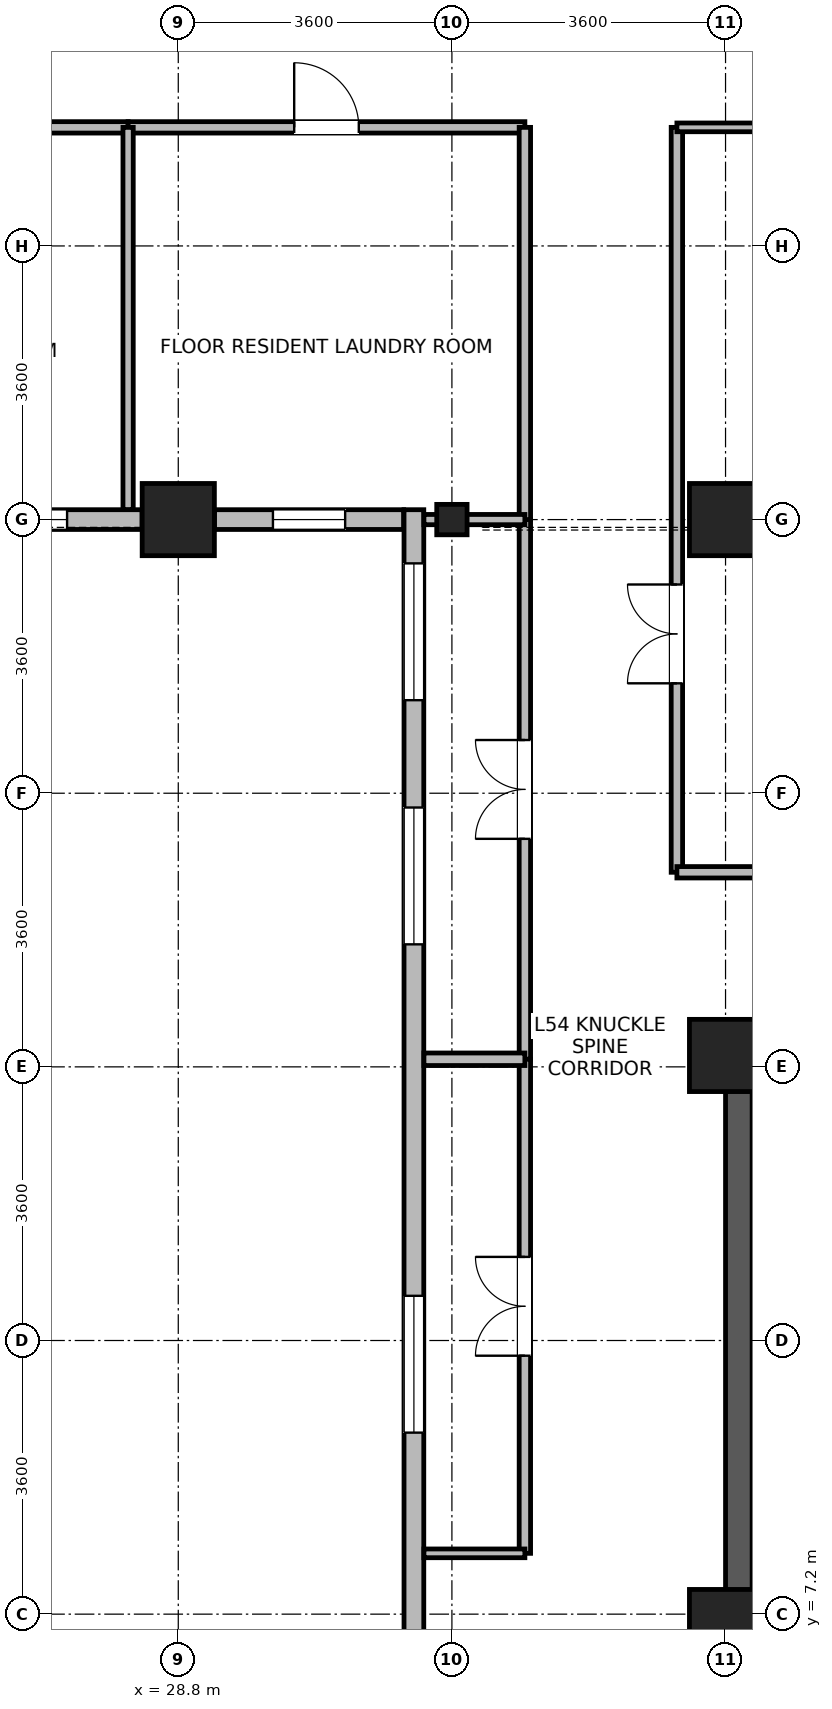
"""IFC4 building model, lengths in metres.
Left out: names, types, materials, properties, quantities, classifications, styles, units other than length and angle.
Written with IfcOpenShell. Run it as: python <this file> out.ifc"""

import sys

from ifc_helpers import new_model, si_unit, direction, frame, frame_2d, origin, origin_2d, place, context, subcontext, project, spatial, rectangle, i_section, extrude, source, transform, mapped, element, fill, save


model = new_model("IFC4")
c1 = context("Model", 3, precision=1e-05, world=origin(), true_north=direction((0.0, 1.0)))
c2 = subcontext(c1, "Body", "Model", "MODEL_VIEW")
j1 = project(units=[si_unit("LENGTHUNIT", "METRE"), si_unit("PLANEANGLEUNIT", "RADIAN")], contexts=[c1])
p1 = place(None, origin())
s1 = spatial("IfcSite", under=j1, at=p1, CompositionType="ELEMENT")
p2 = place(p1, origin())
s2 = spatial("IfcBuilding", under=s1, at=p2, CompositionType="ELEMENT")
p3 = place(p2, frame((0.0, 0.0, 212.9)))
s3 = spatial("IfcBuildingStorey", under=s2, at=p3, CompositionType="ELEMENT", Elevation=212.9)
p4 = place(p3, frame((36.175, 6.95, 0.0), z_axis=(0.0, 0.0, 1.0), x_axis=(0.0, 1.0, 0.0)))
e1 = element("IfcWall", 1, at=p4, inside=s3, PredefinedType="SHEAR", context=c2, shape_type="SweptSolid", body=[
    extrude(rectangle(XDim=7.7, YDim=0.35, at=frame_2d((3.85, 0.0))), origin(), (0.0, 0.0, 1.0), 3.47),
])
m1 = source(origin(), c2, "Body", "SweptSolid", [
    extrude(rectangle(XDim=0.95, YDim=0.95, at=origin_2d()), origin(), (0.0, 0.0, 1.0), 3.7),
])
for number, where, z_axis, x_axis in (
    (2, (28.8, 21.6, 0.0), (0.0, 0.0, 1.0), (1.0, 0.0, 0.0)),
    (3, (36.0, 21.6, 0.0), (0.0, 0.0, 1.0), (1.0, 0.0, 0.0)),
    (4, (36.0, 7.05, 0.0), (0.0, 0.0, 1.0), (1.0, 0.0, 0.0)),
    (5, (36.0, 14.55, 0.0), (0.0, 0.0, 1.0), (1.0, 0.0, 0.0)),
):
    element("IfcColumn", number, at=place(p3, frame(where, z_axis=z_axis, x_axis=x_axis)), inside=s3, PredefinedType="COLUMN", context=c2, shape_type="MappedRepresentation", body=[
        mapped(m1, transform((0.0, 0.0, 0.0), x_axis=(1.0, 0.0, 0.0), y_axis=(0.0, 1.0, 0.0), z_axis=(0.0, 0.0, 1.0), scale=1.0)),
    ])
m2 = source(origin(), c2, "Body", "SweptSolid", [
    extrude(i_section(OverallWidth=0.399, OverallDepth=0.4, WebThickness=0.017, FlangeThickness=0.023, FilletRadius=0.015, at=origin_2d()), origin(), (0.0, 0.0, 1.0), 3.7),
])
p5 = place(p3, frame((32.4, 21.6, 0.0), z_axis=(0.0, 0.0, 1.0), x_axis=(1.0, 0.0, 0.0)))
e6 = element("IfcColumn", 6, at=p5, inside=s3, PredefinedType="COLUMN", context=c2, shape_type="MappedRepresentation", body=[
    mapped(m2, transform((0.0, 0.0, 0.0), x_axis=(1.0, 0.0, 0.0), y_axis=(0.0, 1.0, 0.0), z_axis=(0.0, 0.0, 1.0), scale=1.0)),
])
p6 = place(p3, frame((28.324, 21.6, 0.0), z_axis=(0.0, 0.0, 1.0), x_axis=(-1.0, 0.0, 0.0)))
e7 = element("IfcWall", 7, at=p6, inside=s3, PredefinedType="STANDARD", context=c2, shape_type="SweptSolid", body=[
    extrude(rectangle(XDim=2.924, YDim=0.26, at=frame_2d((1.462, 0.0))), origin(), (0.0, 0.0, 1.0), 3.05),
])
p7 = place(p6, frame((0.987, 0.0, 0.85)))
e8 = element("IfcOpeningElement", 8, at=p7, cuts=e7, PredefinedType="OPENING", context=c2, shape_type="SweptSolid", body=[
    extrude(rectangle(XDim=0.95, YDim=1.75, at=frame_2d((0.475, 0.875))), frame((0.0, 0.14, 0.0), z_axis=(0.0, -1.0, 0.0), x_axis=(1.0, 0.0, 0.0)), (0.0, 0.0, 1.0), 0.28),
])
p8 = place(p3, frame((31.765, 21.6, 0.0), z_axis=(0.0, 0.0, 1.0), x_axis=(-1.0, 0.0, 0.0)))
e9 = element("IfcWall", 9, at=p8, inside=s3, PredefinedType="STANDARD", context=c2, shape_type="SweptSolid", body=[
    extrude(rectangle(XDim=2.489, YDim=0.26, at=frame_2d((1.245, 0.0))), origin(), (0.0, 0.0, 1.0), 3.05),
])
p9 = place(p8, frame((0.77, 0.0, 0.85)))
e10 = element("IfcOpeningElement", 10, at=p9, cuts=e9, PredefinedType="OPENING", context=c2, shape_type="SweptSolid", body=[
    extrude(rectangle(XDim=0.95, YDim=1.75, at=frame_2d((0.475, 0.875))), frame((0.0, 0.14, 0.0), z_axis=(0.0, -1.0, 0.0), x_axis=(1.0, 0.0, 0.0)), (0.0, 0.0, 1.0), 0.28),
])
p10 = place(p3, frame((31.9, 5.67, 0.0), z_axis=(0.0, 0.0, 1.0), x_axis=(0.0, 1.0, 0.0)))
e11 = element("IfcWall", 11, at=p10, inside=s3, PredefinedType="STANDARD", context=c2, shape_type="SweptSolid", body=[
    extrude(rectangle(XDim=16.06, YDim=0.26, at=frame_2d((8.03, 0.0))), origin(), (0.0, 0.0, 1.0), 3.45),
])
p11 = place(p10, frame((3.918, 0.0, 0.85)))
e12 = element("IfcOpeningElement", 12, at=p11, cuts=e11, PredefinedType="OPENING", context=c2, shape_type="SweptSolid", body=[
    extrude(rectangle(XDim=1.8, YDim=1.85, at=frame_2d((0.9, 0.925))), frame((0.0, 0.14, 0.0), z_axis=(0.0, -1.0, 0.0), x_axis=(1.0, 0.0, 0.0)), (0.0, 0.0, 1.0), 0.28),
])
p12 = place(p10, frame((10.342, 0.0, 0.85)))
e13 = element("IfcOpeningElement", 13, at=p12, cuts=e11, PredefinedType="OPENING", context=c2, shape_type="SweptSolid", body=[
    extrude(rectangle(XDim=1.8, YDim=1.85, at=frame_2d((0.9, 0.925))), frame((0.0, 0.14, 0.0), z_axis=(0.0, -1.0, 0.0), x_axis=(1.0, 0.0, 0.0)), (0.0, 0.0, 1.0), 0.28),
])
p13 = place(p10, frame((13.554, 0.0, 0.85)))
e14 = element("IfcOpeningElement", 14, at=p13, cuts=e11, PredefinedType="OPENING", context=c2, shape_type="SweptSolid", body=[
    extrude(rectangle(XDim=1.8, YDim=1.85, at=frame_2d((0.9, 0.925))), frame((0.0, 0.14, 0.0), z_axis=(0.0, -1.0, 0.0), x_axis=(1.0, 0.0, 0.0)), (0.0, 0.0, 1.0), 0.28),
])
p14 = place(p3, frame((35.36, 16.96, 0.0), z_axis=(0.0, 0.0, 1.0), x_axis=(0.0, 1.0, 0.0)))
e15 = element("IfcWall", 15, at=p14, inside=s3, PredefinedType="PARTITIONING", context=c2, shape_type="SweptSolid", body=[
    extrude(rectangle(XDim=9.8, YDim=0.15, at=frame_2d((4.9, 0.0))), origin(), (0.0, 0.0, 1.0), 3.45),
])
p15 = place(p14, frame((2.486, 0.0, 0.0)))
e16 = element("IfcOpeningElement", 16, at=p15, cuts=e15, PredefinedType="OPENING", context=c2, shape_type="SweptSolid", body=[
    extrude(rectangle(XDim=1.3, YDim=2.12, at=frame_2d((0.65, 1.06))), frame((0.0, 0.085, 0.0), z_axis=(0.0, -1.0, 0.0), x_axis=(1.0, 0.0, 0.0)), (0.0, 0.0, 1.0), 0.17),
])
p16 = place(p3, frame((33.36, 14.5, 0.0), z_axis=(0.0, 0.0, 1.0), x_axis=(0.0, 1.0, 0.0)))
e17 = element("IfcWall", 17, at=p16, inside=s3, PredefinedType="PARTITIONING", context=c2, shape_type="SweptSolid", body=[
    extrude(rectangle(XDim=7.1, YDim=0.15, at=frame_2d((3.55, 0.0))), origin(), (0.0, 0.0, 1.0), 3.45),
])
p17 = place(p16, frame((2.9, 0.0, 0.0)))
e18 = element("IfcOpeningElement", 18, at=p17, cuts=e17, PredefinedType="OPENING", context=c2, shape_type="SweptSolid", body=[
    extrude(rectangle(XDim=1.3, YDim=2.12, at=frame_2d((0.65, 1.06))), frame((0.0, 0.085, 0.0), z_axis=(0.0, -1.0, 0.0), x_axis=(1.0, 0.0, 0.0)), (0.0, 0.0, 1.0), 0.17),
])
p18 = place(p3, frame((35.36, 16.96, 0.0), z_axis=(0.0, 0.0, 1.0), x_axis=(1.0, 0.0, 0.0)))
e19 = element("IfcWall", 19, at=p18, inside=s3, PredefinedType="PARTITIONING", context=c2, shape_type="SweptSolid", body=[
    extrude(rectangle(XDim=7.06, YDim=0.15, at=frame_2d((3.53, 0.0))), origin(), (0.0, 0.0, 1.0), 3.45),
])
p19 = place(p3, frame((33.36, 8.0, 0.0), z_axis=(0.0, 0.0, 1.0), x_axis=(0.0, 1.0, 0.0)))
e20 = element("IfcWall", 20, at=p19, inside=s3, PredefinedType="PARTITIONING", context=c2, shape_type="SweptSolid", body=[
    extrude(rectangle(XDim=6.5, YDim=0.15, at=frame_2d((3.25, 0.0))), origin(), (0.0, 0.0, 1.0), 3.45),
])
p20 = place(p19, frame((2.6, 0.0, 0.0)))
e21 = element("IfcOpeningElement", 21, at=p20, cuts=e20, PredefinedType="OPENING", context=c2, shape_type="SweptSolid", body=[
    extrude(rectangle(XDim=1.3, YDim=2.12, at=frame_2d((0.65, 1.06))), frame((0.0, 0.085, 0.0), z_axis=(0.0, -1.0, 0.0), x_axis=(1.0, 0.0, 0.0)), (0.0, 0.0, 1.0), 0.17),
])
p21 = place(p3, frame((22.42, 26.76, 0.0), z_axis=(0.0, 0.0, 1.0), x_axis=(1.0, 0.0, 0.0)))
e22 = element("IfcWall", 22, at=p21, inside=s3, PredefinedType="PARTITIONING", context=c2, shape_type="SweptSolid", body=[
    extrude(rectangle(XDim=5.72, YDim=0.15, at=frame_2d((2.86, 0.0))), origin(), (0.0, 0.0, 1.0), 3.45),
])
p22 = place(p21, frame((2.385, 0.0, 0.0)))
e23 = element("IfcOpeningElement", 23, at=p22, cuts=e22, PredefinedType="OPENING", context=c2, shape_type="SweptSolid", body=[
    extrude(rectangle(XDim=0.95, YDim=2.1, at=frame_2d((0.475, 1.05))), frame((0.0, 0.085, 0.0), z_axis=(0.0, -1.0, 0.0), x_axis=(1.0, 0.0, 0.0)), (0.0, 0.0, 1.0), 0.17),
])
p23 = place(p3, frame((28.14, 26.76, 0.0), z_axis=(0.0, 0.0, 1.0), x_axis=(1.0, 0.0, 0.0)))
e24 = element("IfcWall", 24, at=p23, inside=s3, PredefinedType="PARTITIONING", context=c2, shape_type="SweptSolid", body=[
    extrude(rectangle(XDim=5.22, YDim=0.15, at=frame_2d((2.61, 0.0))), origin(), (0.0, 0.0, 1.0), 3.45),
])
p24 = place(p23, frame((2.185, 0.0, 0.0)))
e25 = element("IfcOpeningElement", 25, at=p24, cuts=e24, PredefinedType="OPENING", context=c2, shape_type="SweptSolid", body=[
    extrude(rectangle(XDim=0.85, YDim=2.04, at=frame_2d((0.425, 1.02))), frame((0.0, 0.085, 0.0), z_axis=(0.0, -1.0, 0.0), x_axis=(1.0, 0.0, 0.0)), (0.0, 0.0, 1.0), 0.17),
])
p25 = place(p3, frame((33.36, 21.6, 0.0), z_axis=(0.0, 0.0, 1.0), x_axis=(0.0, 1.0, 0.0)))
e26 = element("IfcWall", 26, at=p25, inside=s3, PredefinedType="PARTITIONING", context=c2, shape_type="SweptSolid", body=[
    extrude(rectangle(XDim=5.16, YDim=0.15, at=frame_2d((2.58, 0.0))), origin(), (0.0, 0.0, 1.0), 3.45),
])
p26 = place(p3, frame((35.36, 26.76, 0.0), z_axis=(0.0, 0.0, 1.0), x_axis=(1.0, 0.0, 0.0)))
e27 = element("IfcWall", 27, at=p26, inside=s3, PredefinedType="PARTITIONING", context=c2, shape_type="SweptSolid", body=[
    extrude(rectangle(XDim=7.06, YDim=0.115, at=frame_2d((3.53, 0.0))), origin(), (0.0, 0.0, 1.0), 3.45),
])
p27 = place(p3, frame((28.14, 21.732, 0.0), z_axis=(0.0, 0.0, 1.0), x_axis=(0.0, 1.0, 0.0)))
e28 = element("IfcWall", 28, at=p27, inside=s3, PredefinedType="PARTITIONING", context=c2, shape_type="SweptSolid", body=[
    extrude(rectangle(XDim=5.028, YDim=0.135, at=frame_2d((2.514, 0.0))), origin(), (0.0, 0.0, 1.0), 3.45),
])
p28 = place(p3, frame((32.032, 8.0, 0.0), z_axis=(0.0, 0.0, 1.0), x_axis=(1.0, 0.0, 0.0)))
e29 = element("IfcWall", 29, at=p28, inside=s3, PredefinedType="PARTITIONING", context=c2, shape_type="SweptSolid", body=[
    extrude(rectangle(XDim=1.328, YDim=0.115, at=frame_2d((0.664, 0.0))), origin(), (0.0, 0.0, 1.0), 3.45),
])
p29 = place(p3, frame((32.032, 14.5, 0.0), z_axis=(0.0, 0.0, 1.0), x_axis=(1.0, 0.0, 0.0)))
e30 = element("IfcWall", 30, at=p29, inside=s3, PredefinedType="PARTITIONING", context=c2, shape_type="SweptSolid", body=[
    extrude(rectangle(XDim=1.328, YDim=0.165, at=frame_2d((0.664, 0.0))), origin(), (0.0, 0.0, 1.0), 3.45),
])
p30 = place(p3, frame((32.032, 21.6, 0.0), z_axis=(0.0, 0.0, 1.0), x_axis=(1.0, 0.0, 0.0)))
e31 = element("IfcWall", 31, at=p30, inside=s3, PredefinedType="PARTITIONING", context=c2, shape_type="SweptSolid", body=[
    extrude(rectangle(XDim=1.328, YDim=0.135, at=frame_2d((0.664, 0.0))), origin(), (0.0, 0.0, 1.0), 3.05),
])
p31 = place(p7, origin())
e32 = element("IfcWindow", 32, at=p31, inside=s3, PartitioningType="SINGLE_PANEL", PredefinedType="WINDOW", context=c2, shape_type="SweptSolid", body=[
    extrude(rectangle(XDim=0.95, YDim=1.75, at=frame_2d((0.475, 0.875))), frame((0.0, 0.03, 0.0), z_axis=(0.0, -1.0, 0.0), x_axis=(1.0, 0.0, 0.0)), (0.0, 0.0, 1.0), 0.06),
])
fill(e8, e32)
p32 = place(p9, origin())
e33 = element("IfcWindow", 33, at=p32, inside=s3, PartitioningType="SINGLE_PANEL", PredefinedType="WINDOW", context=c2, shape_type="SweptSolid", body=[
    extrude(rectangle(XDim=0.95, YDim=1.75, at=frame_2d((0.475, 0.875))), frame((0.0, 0.03, 0.0), z_axis=(0.0, -1.0, 0.0), x_axis=(1.0, 0.0, 0.0)), (0.0, 0.0, 1.0), 0.06),
])
fill(e10, e33)
p33 = place(p11, origin())
e34 = element("IfcWindow", 34, at=p33, inside=s3, PartitioningType="SINGLE_PANEL", PredefinedType="WINDOW", context=c2, shape_type="SweptSolid", body=[
    extrude(rectangle(XDim=1.8, YDim=1.85, at=frame_2d((0.9, 0.925))), frame((0.0, 0.03, 0.0), z_axis=(0.0, -1.0, 0.0), x_axis=(1.0, 0.0, 0.0)), (0.0, 0.0, 1.0), 0.06),
])
fill(e12, e34)
p34 = place(p12, origin())
e35 = element("IfcWindow", 35, at=p34, inside=s3, PartitioningType="SINGLE_PANEL", PredefinedType="WINDOW", context=c2, shape_type="SweptSolid", body=[
    extrude(rectangle(XDim=1.8, YDim=1.85, at=frame_2d((0.9, 0.925))), frame((0.0, 0.03, 0.0), z_axis=(0.0, -1.0, 0.0), x_axis=(1.0, 0.0, 0.0)), (0.0, 0.0, 1.0), 0.06),
])
fill(e13, e35)
p35 = place(p13, origin())
e36 = element("IfcWindow", 36, at=p35, inside=s3, PartitioningType="SINGLE_PANEL", PredefinedType="WINDOW", context=c2, shape_type="SweptSolid", body=[
    extrude(rectangle(XDim=1.8, YDim=1.85, at=frame_2d((0.9, 0.925))), frame((0.0, 0.03, 0.0), z_axis=(0.0, -1.0, 0.0), x_axis=(1.0, 0.0, 0.0)), (0.0, 0.0, 1.0), 0.06),
])
fill(e14, e36)
p36 = place(p15, origin())
e37 = element("IfcDoor", 37, at=p36, inside=s3, OperationType="DOUBLE_DOOR_SINGLE_SWING", PredefinedType="DOOR", context=c2, shape_type="SweptSolid", body=[
    extrude(rectangle(XDim=1.3, YDim=2.12, at=frame_2d((0.65, 1.06))), frame((0.0, 0.025, 0.0), z_axis=(0.0, -1.0, 0.0), x_axis=(1.0, 0.0, 0.0)), (0.0, 0.0, 1.0), 0.05),
])
fill(e16, e37)
p37 = place(p17, origin())
e38 = element("IfcDoor", 38, at=p37, inside=s3, OperationType="DOUBLE_DOOR_SINGLE_SWING", PredefinedType="DOOR", context=c2, shape_type="SweptSolid", body=[
    extrude(rectangle(XDim=1.3, YDim=2.12, at=frame_2d((0.65, 1.06))), frame((0.0, 0.025, 0.0), z_axis=(0.0, -1.0, 0.0), x_axis=(1.0, 0.0, 0.0)), (0.0, 0.0, 1.0), 0.05),
])
fill(e18, e38)
p38 = place(p20, origin())
e39 = element("IfcDoor", 39, at=p38, inside=s3, OperationType="DOUBLE_DOOR_SINGLE_SWING", PredefinedType="DOOR", context=c2, shape_type="SweptSolid", body=[
    extrude(rectangle(XDim=1.3, YDim=2.12, at=frame_2d((0.65, 1.06))), frame((0.0, 0.025, 0.0), z_axis=(0.0, -1.0, 0.0), x_axis=(1.0, 0.0, 0.0)), (0.0, 0.0, 1.0), 0.05),
])
fill(e21, e39)
p39 = place(p24, origin())
e40 = element("IfcDoor", 40, at=p39, inside=s3, OperationType="SINGLE_SWING_LEFT", PredefinedType="DOOR", context=c2, shape_type="SweptSolid", body=[
    extrude(rectangle(XDim=0.85, YDim=2.04, at=frame_2d((0.425, 1.02))), frame((0.0, 0.025, 0.0), z_axis=(0.0, -1.0, 0.0), x_axis=(1.0, 0.0, 0.0)), (0.0, 0.0, 1.0), 0.05),
])
fill(e25, e40)
save(model, sys.argv[1])
